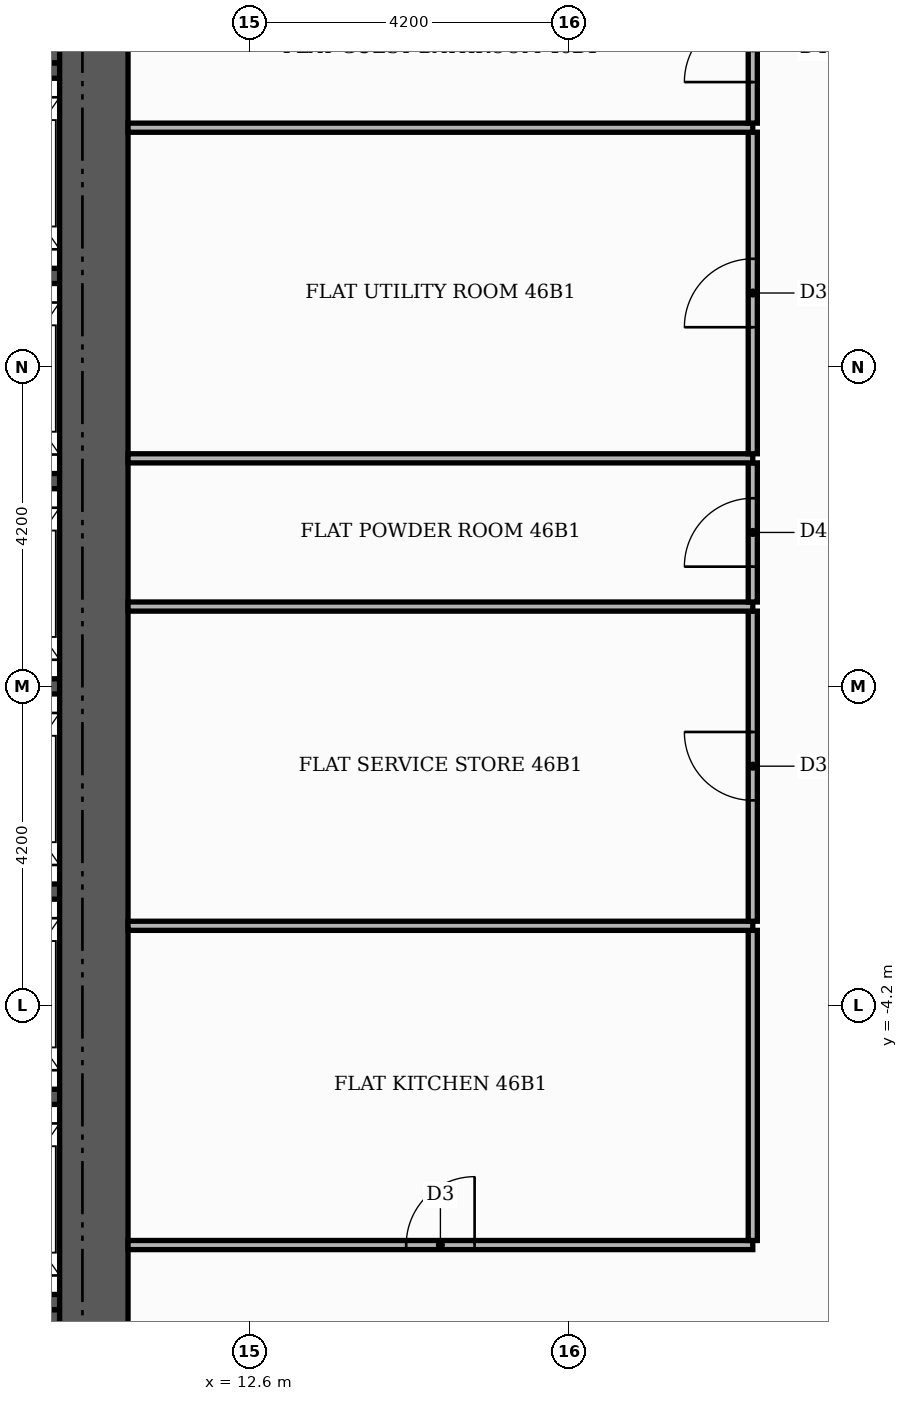
"""IFC4 building model, lengths in metres.
Left out: names, types, materials, properties, quantities, classifications, styles, units other than length and angle.
Written with IfcOpenShell. Run it as: python <this file> out.ifc"""

import sys

from ifc_helpers import new_model, si_unit, direction, frame, frame_2d, origin, place, context, subcontext, project, spatial, rectangle, extrude, element, fill, save


model = new_model("IFC4")
c1 = context("Model", 3, precision=1e-05, world=origin(), true_north=direction((0.0, 1.0)))
c2 = subcontext(c1, "Body", "Model", "MODEL_VIEW")
j1 = project(units=[si_unit("LENGTHUNIT", "METRE"), si_unit("PLANEANGLEUNIT", "RADIAN")], contexts=[c1])
p1 = place(None, origin())
s1 = spatial("IfcSite", under=j1, at=p1, CompositionType="ELEMENT")
p2 = place(p1, origin())
s2 = spatial("IfcBuilding", under=s1, at=p2, CompositionType="ELEMENT")
p3 = place(p2, frame((0.0, 0.0, 196.2)))
s3 = spatial("IfcBuildingStorey", under=s2, at=p3, CompositionType="ELEMENT", Elevation=196.2)
for number, where, z_axis, x_axis in (
    (1, (5.5, -9.15, 0.0), (0.0, 0.0, 1.0), (1.0, 0.0, 0.0)),
    (2, (5.5, 9.15, 0.0), (0.0, 0.0, 1.0), (1.0, 0.0, 0.0)),
):
    element("IfcWall", number, at=place(p3, frame(where, z_axis=z_axis, x_axis=x_axis)), inside=s3, PredefinedType="SHEAR", context=c2, shape_type="SweptSolid", body=[
        extrude(rectangle(XDim=4.6, YDim=1.9, at=frame_2d((2.3, 0.0))), origin(), (0.0, 0.0, 1.0), 3.48),
    ])
for number, where, z_axis, x_axis in (
    (3, (8.1, -8.1, 0.0), (0.0, 0.0, 1.0), (1.0, 0.0, 0.0)),
    (4, (8.1, -5.4, 0.0), (0.0, 0.0, 1.0), (1.0, 0.0, 0.0)),
    (5, (8.1, -2.7, 0.0), (0.0, 0.0, 1.0), (1.0, 0.0, 0.0)),
    (6, (8.1, 0.0, 0.0), (0.0, 0.0, 1.0), (1.0, 0.0, 0.0)),
    (7, (8.1, 2.7, 0.0), (0.0, 0.0, 1.0), (1.0, 0.0, 0.0)),
    (8, (8.1, 5.4, 0.0), (0.0, 0.0, 1.0), (1.0, 0.0, 0.0)),
    (9, (8.1, 8.1, 0.0), (0.0, 0.0, 1.0), (1.0, 0.0, 0.0)),
):
    element("IfcWall", number, at=place(p3, frame(where, z_axis=z_axis, x_axis=x_axis)), inside=s3, PredefinedType="SHEAR", context=c2, shape_type="SweptSolid", body=[
        extrude(rectangle(XDim=2.0, YDim=0.2, at=frame_2d((1.0, 0.0))), origin(), (0.0, 0.0, 1.0), 3.48),
    ])
p4 = place(p3, frame((10.55, -10.1, 0.0), z_axis=(0.0, 0.0, 1.0), x_axis=(0.0, 1.0, 0.0)))
e10 = element("IfcWall", 10, at=p4, inside=s3, PredefinedType="SHEAR", context=c2, shape_type="SweptSolid", body=[
    extrude(rectangle(XDim=20.2, YDim=0.9, at=frame_2d((10.1, 0.0))), origin(), (0.0, 0.0, 1.0), 3.48),
])
p5 = place(p3, frame((11.0, -7.35, 0.0), z_axis=(0.0, 0.0, 1.0), x_axis=(1.0, 0.0, 0.0)))
e11 = element("IfcWall", 11, at=p5, inside=s3, PredefinedType="PARTITIONING", context=c2, shape_type="SweptSolid", body=[
    extrude(rectangle(XDim=8.22, YDim=0.12, at=frame_2d((4.11, 0.0))), origin(), (0.0, 0.0, 1.0), 3.48),
])
p6 = place(p5, frame((3.66, 0.0, 0.0)))
e12 = element("IfcOpeningElement", 12, at=p6, cuts=e11, PredefinedType="OPENING", context=c2, shape_type="SweptSolid", body=[
    extrude(rectangle(XDim=0.9, YDim=2.1, at=frame_2d((0.45, 1.05))), frame((0.0, 0.07, 0.0), z_axis=(0.0, -1.0, 0.0), x_axis=(1.0, 0.0, 0.0)), (0.0, 0.0, 1.0), 0.14),
])
p7 = place(p3, frame((19.22, -7.29, 0.0), z_axis=(0.0, 0.0, 1.0), x_axis=(0.0, 1.0, 0.0)))
e13 = element("IfcWall", 13, at=p7, inside=s3, PredefinedType="PARTITIONING", context=c2, shape_type="SweptSolid", body=[
    extrude(rectangle(XDim=4.08, YDim=0.12, at=frame_2d((2.04, 0.0))), origin(), (0.0, 0.0, 1.0), 3.48),
])
p8 = place(p3, frame((11.0, -3.15, 0.0), z_axis=(0.0, 0.0, 1.0), x_axis=(1.0, 0.0, 0.0)))
e14 = element("IfcWall", 14, at=p8, inside=s3, PredefinedType="PARTITIONING", context=c2, shape_type="SweptSolid", body=[
    extrude(rectangle(XDim=8.22, YDim=0.12, at=frame_2d((4.11, 0.0))), origin(), (0.0, 0.0, 1.0), 3.48),
])
p9 = place(p3, frame((19.22, -3.09, 0.0), z_axis=(0.0, 0.0, 1.0), x_axis=(0.0, 1.0, 0.0)))
e15 = element("IfcWall", 15, at=p9, inside=s3, PredefinedType="PARTITIONING", context=c2, shape_type="SweptSolid", body=[
    extrude(rectangle(XDim=4.08, YDim=0.12, at=frame_2d((2.04, 0.0))), origin(), (0.0, 0.0, 1.0), 3.48),
])
p10 = place(p9, frame((1.59, 0.0, 0.0)))
e16 = element("IfcOpeningElement", 16, at=p10, cuts=e15, PredefinedType="OPENING", context=c2, shape_type="SweptSolid", body=[
    extrude(rectangle(XDim=0.9, YDim=2.1, at=frame_2d((0.45, 1.05))), frame((0.0, 0.07, 0.0), z_axis=(0.0, -1.0, 0.0), x_axis=(1.0, 0.0, 0.0)), (0.0, 0.0, 1.0), 0.14),
])
p11 = place(p3, frame((11.0, 1.05, 0.0), z_axis=(0.0, 0.0, 1.0), x_axis=(1.0, 0.0, 0.0)))
e17 = element("IfcWall", 17, at=p11, inside=s3, PredefinedType="PARTITIONING", context=c2, shape_type="SweptSolid", body=[
    extrude(rectangle(XDim=8.22, YDim=0.12, at=frame_2d((4.11, 0.0))), origin(), (0.0, 0.0, 1.0), 3.48),
])
p12 = place(p3, frame((19.22, 1.11, 0.0), z_axis=(0.0, 0.0, 1.0), x_axis=(0.0, 1.0, 0.0)))
e18 = element("IfcWall", 18, at=p12, inside=s3, PredefinedType="PARTITIONING", context=c2, shape_type="SweptSolid", body=[
    extrude(rectangle(XDim=1.83, YDim=0.12, at=frame_2d((0.915, 0.0))), origin(), (0.0, 0.0, 1.0), 3.48),
])
p13 = place(p12, frame((0.465, 0.0, 0.0)))
e19 = element("IfcOpeningElement", 19, at=p13, cuts=e18, PredefinedType="OPENING", context=c2, shape_type="SweptSolid", body=[
    extrude(rectangle(XDim=0.9, YDim=2.1, at=frame_2d((0.45, 1.05))), frame((0.0, 0.07, 0.0), z_axis=(0.0, -1.0, 0.0), x_axis=(1.0, 0.0, 0.0)), (0.0, 0.0, 1.0), 0.14),
])
p14 = place(p3, frame((11.0, 3.0, 0.0), z_axis=(0.0, 0.0, 1.0), x_axis=(1.0, 0.0, 0.0)))
e20 = element("IfcWall", 20, at=p14, inside=s3, PredefinedType="PARTITIONING", context=c2, shape_type="SweptSolid", body=[
    extrude(rectangle(XDim=8.22, YDim=0.12, at=frame_2d((4.11, 0.0))), origin(), (0.0, 0.0, 1.0), 3.48),
])
p15 = place(p3, frame((19.22, 3.06, 0.0), z_axis=(0.0, 0.0, 1.0), x_axis=(0.0, 1.0, 0.0)))
e21 = element("IfcWall", 21, at=p15, inside=s3, PredefinedType="PARTITIONING", context=c2, shape_type="SweptSolid", body=[
    extrude(rectangle(XDim=4.23, YDim=0.12, at=frame_2d((2.115, 0.0))), origin(), (0.0, 0.0, 1.0), 3.48),
])
p16 = place(p15, frame((1.665, 0.0, 0.0)))
e22 = element("IfcOpeningElement", 22, at=p16, cuts=e21, PredefinedType="OPENING", context=c2, shape_type="SweptSolid", body=[
    extrude(rectangle(XDim=0.9, YDim=2.1, at=frame_2d((0.45, 1.05))), frame((0.0, 0.07, 0.0), z_axis=(0.0, -1.0, 0.0), x_axis=(1.0, 0.0, 0.0)), (0.0, 0.0, 1.0), 0.14),
])
p17 = place(p3, frame((11.0, 7.35, 0.0), z_axis=(0.0, 0.0, 1.0), x_axis=(1.0, 0.0, 0.0)))
e23 = element("IfcWall", 23, at=p17, inside=s3, PredefinedType="PARTITIONING", context=c2, shape_type="SweptSolid", body=[
    extrude(rectangle(XDim=8.22, YDim=0.12, at=frame_2d((4.11, 0.0))), origin(), (0.0, 0.0, 1.0), 3.48),
])
p18 = place(p3, frame((19.22, 7.41, 0.0), z_axis=(0.0, 0.0, 1.0), x_axis=(0.0, 1.0, 0.0)))
e24 = element("IfcWall", 24, at=p18, inside=s3, PredefinedType="PARTITIONING", context=c2, shape_type="SweptSolid", body=[
    extrude(rectangle(XDim=1.98, YDim=0.12, at=frame_2d((0.99, 0.0))), origin(), (0.0, 0.0, 1.0), 3.48),
])
p19 = place(p18, frame((0.54, 0.0, 0.0)))
e25 = element("IfcOpeningElement", 25, at=p19, cuts=e24, PredefinedType="OPENING", context=c2, shape_type="SweptSolid", body=[
    extrude(rectangle(XDim=0.9, YDim=2.1, at=frame_2d((0.45, 1.05))), frame((0.0, 0.07, 0.0), z_axis=(0.0, -1.0, 0.0), x_axis=(1.0, 0.0, 0.0)), (0.0, 0.0, 1.0), 0.14),
])
p20 = place(p6, origin())
e26 = element("IfcDoor", 26, at=p20, inside=s3, OperationType="SINGLE_SWING_RIGHT", PredefinedType="DOOR", context=c2, shape_type="SweptSolid", body=[
    extrude(rectangle(XDim=0.9, YDim=2.1, at=frame_2d((0.45, 1.05))), frame((0.0, 0.025, 0.0), z_axis=(0.0, -1.0, 0.0), x_axis=(1.0, 0.0, 0.0)), (0.0, 0.0, 1.0), 0.05),
])
fill(e12, e26)
p21 = place(p10, origin())
e27 = element("IfcDoor", 27, at=p21, inside=s3, OperationType="SINGLE_SWING_RIGHT", PredefinedType="DOOR", context=c2, shape_type="SweptSolid", body=[
    extrude(rectangle(XDim=0.9, YDim=2.1, at=frame_2d((0.45, 1.05))), frame((0.0, 0.025, 0.0), z_axis=(0.0, -1.0, 0.0), x_axis=(1.0, 0.0, 0.0)), (0.0, 0.0, 1.0), 0.05),
])
fill(e16, e27)
p22 = place(p13, origin())
e28 = element("IfcDoor", 28, at=p22, inside=s3, OperationType="SINGLE_SWING_LEFT", PredefinedType="DOOR", context=c2, shape_type="SweptSolid", body=[
    extrude(rectangle(XDim=0.9, YDim=2.1, at=frame_2d((0.45, 1.05))), frame((0.0, 0.025, 0.0), z_axis=(0.0, -1.0, 0.0), x_axis=(1.0, 0.0, 0.0)), (0.0, 0.0, 1.0), 0.05),
])
fill(e19, e28)
p23 = place(p16, origin())
e29 = element("IfcDoor", 29, at=p23, inside=s3, OperationType="SINGLE_SWING_LEFT", PredefinedType="DOOR", context=c2, shape_type="SweptSolid", body=[
    extrude(rectangle(XDim=0.9, YDim=2.1, at=frame_2d((0.45, 1.05))), frame((0.0, 0.025, 0.0), z_axis=(0.0, -1.0, 0.0), x_axis=(1.0, 0.0, 0.0)), (0.0, 0.0, 1.0), 0.05),
])
fill(e22, e29)
p24 = place(p19, origin())
e30 = element("IfcDoor", 30, at=p24, inside=s3, OperationType="SINGLE_SWING_LEFT", PredefinedType="DOOR", context=c2, shape_type="SweptSolid", body=[
    extrude(rectangle(XDim=0.9, YDim=2.1, at=frame_2d((0.45, 1.05))), frame((0.0, 0.025, 0.0), z_axis=(0.0, -1.0, 0.0), x_axis=(1.0, 0.0, 0.0)), (0.0, 0.0, 1.0), 0.05),
])
fill(e25, e30)
save(model, sys.argv[1])
